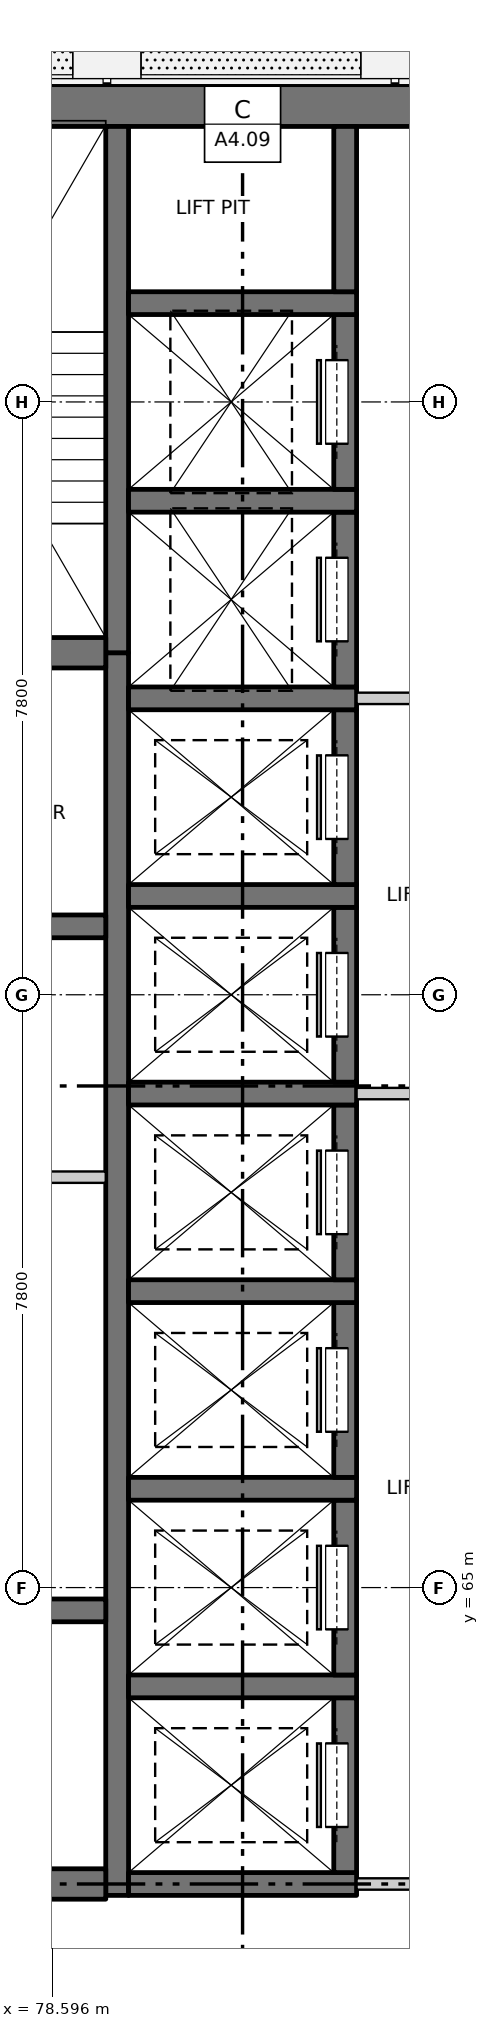
"""IFC4 building model, lengths in metres.
Left out: names, types, materials, properties, quantities, classifications, styles, units other than length and angle.
Written with IfcOpenShell. Run it as: python <this file> out.ifc"""

import sys

from ifc_helpers import new_model, si_unit, direction, frame, frame_2d, origin, place, context, subcontext, project, spatial, rectangle, extrude, element, fill, save


model = new_model("IFC4")
c1 = context("Model", 3, precision=1e-05, world=origin(), true_north=direction((0.0, 1.0)))
c2 = subcontext(c1, "Body", "Model", "MODEL_VIEW")
j1 = project(units=[si_unit("LENGTHUNIT", "METRE"), si_unit("PLANEANGLEUNIT", "RADIAN")], contexts=[c1])
p1 = place(None, origin())
s1 = spatial("IfcSite", under=j1, at=p1, CompositionType="ELEMENT")
p2 = place(p1, origin())
s2 = spatial("IfcBuilding", under=s1, at=p2, CompositionType="ELEMENT")
p3 = place(p2, frame((0.0, 0.0, 130.5)))
s3 = spatial("IfcBuildingStorey", under=s2, at=p3, CompositionType="ELEMENT", Elevation=130.5)
p4 = place(p3, frame((75.525, 84.5, -0.25), z_axis=(0.0, 0.0, 1.0), x_axis=(1.0, 0.0, 0.0)))
e1 = element("IfcWall", 1, at=p4, inside=s3, PredefinedType="SOLIDWALL", context=c2, shape_type="SweptSolid", body=[
    extrude(rectangle(XDim=18.95, YDim=0.55, at=frame_2d((9.475, 0.0))), origin(), (0.0, 0.0, 1.0), 3.4),
])
p5 = place(p3, frame((79.45, 60.95, -0.25), z_axis=(0.0, 0.0, 1.0), x_axis=(0.0, 1.0, 0.0)))
e2 = element("IfcWall", 2, at=p5, inside=s3, PredefinedType="SOLIDWALL", context=c2, shape_type="SweptSolid", body=[
    extrude(rectangle(XDim=16.35, YDim=0.3, at=frame_2d((8.175, 0.0))), origin(), (0.0, 0.0, 1.0), 3.4),
])
p6 = place(p3, frame((79.45, 77.3, -0.25), z_axis=(0.0, 0.0, 1.0), x_axis=(0.0, 1.0, 0.0)))
e3 = element("IfcWall", 3, at=p6, inside=s3, PredefinedType="SOLIDWALL", context=c2, shape_type="SweptSolid", body=[
    extrude(rectangle(XDim=6.925, YDim=0.3, at=frame_2d((3.462, 0.0))), origin(), (0.0, 0.0, 1.0), 3.4),
])
p7 = place(p3, frame((79.6, 61.1, -0.25), z_axis=(0.0, 0.0, 1.0), x_axis=(1.0, 0.0, 0.0)))
e4 = element("IfcWall", 4, at=p7, inside=s3, PredefinedType="SOLIDWALL", context=c2, shape_type="SweptSolid", body=[
    extrude(rectangle(XDim=3.0, YDim=0.3, at=frame_2d((1.5, 0.0))), origin(), (0.0, 0.0, 1.0), 3.4),
])
p8 = place(p3, frame((82.45, 61.25, -0.25), z_axis=(0.0, 0.0, 1.0), x_axis=(0.0, 1.0, 0.0)))
e5 = element("IfcWall", 5, at=p8, inside=s3, PredefinedType="SOLIDWALL", context=c2, shape_type="SweptSolid", body=[
    extrude(rectangle(XDim=2.3, YDim=0.3, at=frame_2d((1.15, 0.0))), origin(), (0.0, 0.0, 1.0), 3.4),
])
p9 = place(p8, frame((0.6, 0.0, 0.25)))
e6 = element("IfcOpeningElement", 6, at=p9, cuts=e5, PredefinedType="OPENING", context=c2, shape_type="SweptSolid", body=[
    extrude(rectangle(XDim=1.1, YDim=2.1, at=frame_2d((0.55, 1.05))), frame((0.0, 0.16, 0.0), z_axis=(0.0, -1.0, 0.0), x_axis=(1.0, 0.0, 0.0)), (0.0, 0.0, 1.0), 0.32),
])
p10 = place(p3, frame((79.6, 63.7, -0.25), z_axis=(0.0, 0.0, 1.0), x_axis=(1.0, 0.0, 0.0)))
e7 = element("IfcWall", 7, at=p10, inside=s3, PredefinedType="SOLIDWALL", context=c2, shape_type="SweptSolid", body=[
    extrude(rectangle(XDim=3.0, YDim=0.3, at=frame_2d((1.5, 0.0))), origin(), (0.0, 0.0, 1.0), 3.4),
])
p11 = place(p3, frame((82.45, 63.85, -0.25), z_axis=(0.0, 0.0, 1.0), x_axis=(0.0, 1.0, 0.0)))
e8 = element("IfcWall", 8, at=p11, inside=s3, PredefinedType="SOLIDWALL", context=c2, shape_type="SweptSolid", body=[
    extrude(rectangle(XDim=2.3, YDim=0.3, at=frame_2d((1.15, 0.0))), origin(), (0.0, 0.0, 1.0), 3.4),
])
p12 = place(p11, frame((0.6, 0.0, 0.25)))
e9 = element("IfcOpeningElement", 9, at=p12, cuts=e8, PredefinedType="OPENING", context=c2, shape_type="SweptSolid", body=[
    extrude(rectangle(XDim=1.1, YDim=2.1, at=frame_2d((0.55, 1.05))), frame((0.0, 0.16, 0.0), z_axis=(0.0, -1.0, 0.0), x_axis=(1.0, 0.0, 0.0)), (0.0, 0.0, 1.0), 0.32),
])
p13 = place(p3, frame((79.6, 66.3, -0.25), z_axis=(0.0, 0.0, 1.0), x_axis=(1.0, 0.0, 0.0)))
e10 = element("IfcWall", 10, at=p13, inside=s3, PredefinedType="SOLIDWALL", context=c2, shape_type="SweptSolid", body=[
    extrude(rectangle(XDim=3.0, YDim=0.3, at=frame_2d((1.5, 0.0))), origin(), (0.0, 0.0, 1.0), 3.4),
])
p14 = place(p3, frame((82.45, 66.45, -0.25), z_axis=(0.0, 0.0, 1.0), x_axis=(0.0, 1.0, 0.0)))
e11 = element("IfcWall", 11, at=p14, inside=s3, PredefinedType="SOLIDWALL", context=c2, shape_type="SweptSolid", body=[
    extrude(rectangle(XDim=2.3, YDim=0.3, at=frame_2d((1.15, 0.0))), origin(), (0.0, 0.0, 1.0), 3.4),
])
p15 = place(p14, frame((0.6, 0.0, 0.25)))
e12 = element("IfcOpeningElement", 12, at=p15, cuts=e11, PredefinedType="OPENING", context=c2, shape_type="SweptSolid", body=[
    extrude(rectangle(XDim=1.1, YDim=2.1, at=frame_2d((0.55, 1.05))), frame((0.0, 0.16, 0.0), z_axis=(0.0, -1.0, 0.0), x_axis=(1.0, 0.0, 0.0)), (0.0, 0.0, 1.0), 0.32),
])
p16 = place(p3, frame((79.6, 68.9, -0.25), z_axis=(0.0, 0.0, 1.0), x_axis=(1.0, 0.0, 0.0)))
e13 = element("IfcWall", 13, at=p16, inside=s3, PredefinedType="SOLIDWALL", context=c2, shape_type="SweptSolid", body=[
    extrude(rectangle(XDim=3.0, YDim=0.3, at=frame_2d((1.5, 0.0))), origin(), (0.0, 0.0, 1.0), 3.4),
])
p17 = place(p3, frame((82.45, 69.05, -0.25), z_axis=(0.0, 0.0, 1.0), x_axis=(0.0, 1.0, 0.0)))
e14 = element("IfcWall", 14, at=p17, inside=s3, PredefinedType="SOLIDWALL", context=c2, shape_type="SweptSolid", body=[
    extrude(rectangle(XDim=2.3, YDim=0.3, at=frame_2d((1.15, 0.0))), origin(), (0.0, 0.0, 1.0), 3.4),
])
p18 = place(p17, frame((0.6, 0.0, 0.25)))
e15 = element("IfcOpeningElement", 15, at=p18, cuts=e14, PredefinedType="OPENING", context=c2, shape_type="SweptSolid", body=[
    extrude(rectangle(XDim=1.1, YDim=2.1, at=frame_2d((0.55, 1.05))), frame((0.0, 0.16, 0.0), z_axis=(0.0, -1.0, 0.0), x_axis=(1.0, 0.0, 0.0)), (0.0, 0.0, 1.0), 0.32),
])
p19 = place(p3, frame((79.6, 71.5, -0.25), z_axis=(0.0, 0.0, 1.0), x_axis=(1.0, 0.0, 0.0)))
e16 = element("IfcWall", 16, at=p19, inside=s3, PredefinedType="SOLIDWALL", context=c2, shape_type="SweptSolid", body=[
    extrude(rectangle(XDim=3.0, YDim=0.3, at=frame_2d((1.5, 0.0))), origin(), (0.0, 0.0, 1.0), 3.4),
])
p20 = place(p3, frame((82.45, 71.65, -0.25), z_axis=(0.0, 0.0, 1.0), x_axis=(0.0, 1.0, 0.0)))
e17 = element("IfcWall", 17, at=p20, inside=s3, PredefinedType="SOLIDWALL", context=c2, shape_type="SweptSolid", body=[
    extrude(rectangle(XDim=2.3, YDim=0.3, at=frame_2d((1.15, 0.0))), origin(), (0.0, 0.0, 1.0), 3.4),
])
p21 = place(p20, frame((0.6, 0.0, 0.25)))
e18 = element("IfcOpeningElement", 18, at=p21, cuts=e17, PredefinedType="OPENING", context=c2, shape_type="SweptSolid", body=[
    extrude(rectangle(XDim=1.1, YDim=2.1, at=frame_2d((0.55, 1.05))), frame((0.0, 0.16, 0.0), z_axis=(0.0, -1.0, 0.0), x_axis=(1.0, 0.0, 0.0)), (0.0, 0.0, 1.0), 0.32),
])
p22 = place(p3, frame((79.6, 74.1, -0.25), z_axis=(0.0, 0.0, 1.0), x_axis=(1.0, 0.0, 0.0)))
e19 = element("IfcWall", 19, at=p22, inside=s3, PredefinedType="SOLIDWALL", context=c2, shape_type="SweptSolid", body=[
    extrude(rectangle(XDim=3.0, YDim=0.3, at=frame_2d((1.5, 0.0))), origin(), (0.0, 0.0, 1.0), 3.4),
])
p23 = place(p3, frame((82.45, 74.25, -0.25), z_axis=(0.0, 0.0, 1.0), x_axis=(0.0, 1.0, 0.0)))
e20 = element("IfcWall", 20, at=p23, inside=s3, PredefinedType="SOLIDWALL", context=c2, shape_type="SweptSolid", body=[
    extrude(rectangle(XDim=2.3, YDim=0.3, at=frame_2d((1.15, 0.0))), origin(), (0.0, 0.0, 1.0), 3.4),
])
p24 = place(p23, frame((0.6, 0.0, 0.25)))
e21 = element("IfcOpeningElement", 21, at=p24, cuts=e20, PredefinedType="OPENING", context=c2, shape_type="SweptSolid", body=[
    extrude(rectangle(XDim=1.1, YDim=2.1, at=frame_2d((0.55, 1.05))), frame((0.0, 0.16, 0.0), z_axis=(0.0, -1.0, 0.0), x_axis=(1.0, 0.0, 0.0)), (0.0, 0.0, 1.0), 0.32),
])
p25 = place(p3, frame((79.6, 76.7, -0.25), z_axis=(0.0, 0.0, 1.0), x_axis=(1.0, 0.0, 0.0)))
e22 = element("IfcWall", 22, at=p25, inside=s3, PredefinedType="SOLIDWALL", context=c2, shape_type="SweptSolid", body=[
    extrude(rectangle(XDim=3.0, YDim=0.3, at=frame_2d((1.5, 0.0))), origin(), (0.0, 0.0, 1.0), 3.4),
])
p26 = place(p3, frame((82.45, 76.85, -0.25), z_axis=(0.0, 0.0, 1.0), x_axis=(0.0, 1.0, 0.0)))
e23 = element("IfcWall", 23, at=p26, inside=s3, PredefinedType="SOLIDWALL", context=c2, shape_type="SweptSolid", body=[
    extrude(rectangle(XDim=2.3, YDim=0.3, at=frame_2d((1.15, 0.0))), origin(), (0.0, 0.0, 1.0), 3.4),
])
p27 = place(p26, frame((0.6, 0.0, 0.25)))
e24 = element("IfcOpeningElement", 24, at=p27, cuts=e23, PredefinedType="OPENING", context=c2, shape_type="SweptSolid", body=[
    extrude(rectangle(XDim=1.1, YDim=2.1, at=frame_2d((0.55, 1.05))), frame((0.0, 0.16, 0.0), z_axis=(0.0, -1.0, 0.0), x_axis=(1.0, 0.0, 0.0)), (0.0, 0.0, 1.0), 0.32),
])
p28 = place(p3, frame((79.6, 79.3, -0.25), z_axis=(0.0, 0.0, 1.0), x_axis=(1.0, 0.0, 0.0)))
e25 = element("IfcWall", 25, at=p28, inside=s3, PredefinedType="SOLIDWALL", context=c2, shape_type="SweptSolid", body=[
    extrude(rectangle(XDim=3.0, YDim=0.3, at=frame_2d((1.5, 0.0))), origin(), (0.0, 0.0, 1.0), 3.4),
])
p29 = place(p3, frame((82.45, 79.45, -0.25), z_axis=(0.0, 0.0, 1.0), x_axis=(0.0, 1.0, 0.0)))
e26 = element("IfcWall", 26, at=p29, inside=s3, PredefinedType="SOLIDWALL", context=c2, shape_type="SweptSolid", body=[
    extrude(rectangle(XDim=2.3, YDim=0.3, at=frame_2d((1.15, 0.0))), origin(), (0.0, 0.0, 1.0), 3.4),
])
p30 = place(p29, frame((0.6, 0.0, 0.25)))
e27 = element("IfcOpeningElement", 27, at=p30, cuts=e26, PredefinedType="OPENING", context=c2, shape_type="SweptSolid", body=[
    extrude(rectangle(XDim=1.1, YDim=2.1, at=frame_2d((0.55, 1.05))), frame((0.0, 0.16, 0.0), z_axis=(0.0, -1.0, 0.0), x_axis=(1.0, 0.0, 0.0)), (0.0, 0.0, 1.0), 0.32),
])
p31 = place(p3, frame((79.6, 81.9, -0.25), z_axis=(0.0, 0.0, 1.0), x_axis=(1.0, 0.0, 0.0)))
e28 = element("IfcWall", 28, at=p31, inside=s3, PredefinedType="SOLIDWALL", context=c2, shape_type="SweptSolid", body=[
    extrude(rectangle(XDim=3.0, YDim=0.3, at=frame_2d((1.5, 0.0))), origin(), (0.0, 0.0, 1.0), 3.4),
])
p32 = place(p3, frame((82.45, 82.05, -0.25), z_axis=(0.0, 0.0, 1.0), x_axis=(0.0, 1.0, 0.0)))
e29 = element("IfcWall", 29, at=p32, inside=s3, PredefinedType="SOLIDWALL", context=c2, shape_type="SweptSolid", body=[
    extrude(rectangle(XDim=2.175, YDim=0.3, at=frame_2d((1.087, 0.0))), origin(), (0.0, 0.0, 1.0), 3.4),
])
p33 = place(p3, frame((75.525, 61.1, -0.25), z_axis=(0.0, 0.0, 1.0), x_axis=(1.0, 0.0, 0.0)))
e30 = element("IfcWall", 30, at=p33, inside=s3, PredefinedType="SOLIDWALL", context=c2, shape_type="SweptSolid", body=[
    extrude(rectangle(XDim=3.775, YDim=0.4, at=frame_2d((1.888, 0.0))), origin(), (0.0, 0.0, 1.0), 3.4),
])
for number, where, z_axis, x_axis in (
    (31, (75.525, 64.7, -0.25), (0.0, 0.0, 1.0), (1.0, 0.0, 0.0)),
    (32, (75.525, 73.7, -0.25), (0.0, 0.0, 1.0), (1.0, 0.0, 0.0)),
):
    element("IfcWall", number, at=place(p3, frame(where, z_axis=z_axis, x_axis=x_axis)), inside=s3, PredefinedType="SOLIDWALL", context=c2, shape_type="SweptSolid", body=[
        extrude(rectangle(XDim=3.775, YDim=0.3, at=frame_2d((1.888, 0.0))), origin(), (0.0, 0.0, 1.0), 3.4),
    ])
p34 = place(p3, frame((75.525, 77.3, -0.25), z_axis=(0.0, 0.0, 1.0), x_axis=(1.0, 0.0, 0.0)))
e33 = element("IfcWall", 33, at=p34, inside=s3, PredefinedType="SOLIDWALL", context=c2, shape_type="SweptSolid", body=[
    extrude(rectangle(XDim=3.775, YDim=0.4, at=frame_2d((1.888, 0.0))), origin(), (0.0, 0.0, 1.0), 3.4),
])
p35 = place(p3, frame((82.6, 61.1, 0.0), z_axis=(0.0, 0.0, 1.0), x_axis=(1.0, 0.0, 0.0)))
e34 = element("IfcWall", 34, at=p35, inside=s3, PredefinedType="PARTITIONING", context=c2, shape_type="SweptSolid", body=[
    extrude(rectangle(XDim=4.8, YDim=0.15, at=frame_2d((2.4, 0.0))), origin(), (0.0, 0.0, 1.0), 3.15),
])
p36 = place(p35, frame((1.5, 0.0, 0.0)))
e35 = element("IfcOpeningElement", 35, at=p36, cuts=e34, PredefinedType="OPENING", context=c2, shape_type="SweptSolid", body=[
    extrude(rectangle(XDim=1.8, YDim=2.1, at=frame_2d((0.9, 1.05))), frame((0.0, 0.085, 0.0), z_axis=(0.0, -1.0, 0.0), x_axis=(1.0, 0.0, 0.0)), (0.0, 0.0, 1.0), 0.17),
])
p37 = place(p3, frame((75.525, 70.4, 0.0), z_axis=(0.0, 0.0, 1.0), x_axis=(1.0, 0.0, 0.0)))
e36 = element("IfcWall", 36, at=p37, inside=s3, PredefinedType="PARTITIONING", context=c2, shape_type="SweptSolid", body=[
    extrude(rectangle(XDim=3.775, YDim=0.15, at=frame_2d((1.887, 0.0))), origin(), (0.0, 0.0, 1.0), 3.15),
])
p38 = place(p3, frame((82.6, 71.5, 0.0), z_axis=(0.0, 0.0, 1.0), x_axis=(1.0, 0.0, 0.0)))
e37 = element("IfcWall", 37, at=p38, inside=s3, PredefinedType="PARTITIONING", context=c2, shape_type="SweptSolid", body=[
    extrude(rectangle(XDim=4.8, YDim=0.15, at=frame_2d((2.4, 0.0))), origin(), (0.0, 0.0, 1.0), 3.15),
])
p39 = place(p38, frame((1.5, 0.0, 0.0)))
e38 = element("IfcOpeningElement", 38, at=p39, cuts=e37, PredefinedType="OPENING", context=c2, shape_type="SweptSolid", body=[
    extrude(rectangle(XDim=1.8, YDim=2.1, at=frame_2d((0.9, 1.05))), frame((0.0, 0.085, 0.0), z_axis=(0.0, -1.0, 0.0), x_axis=(1.0, 0.0, 0.0)), (0.0, 0.0, 1.0), 0.17),
])
p40 = place(p3, frame((82.6, 76.7, 0.0), z_axis=(0.0, 0.0, 1.0), x_axis=(1.0, 0.0, 0.0)))
e39 = element("IfcWall", 39, at=p40, inside=s3, PredefinedType="PARTITIONING", context=c2, shape_type="SweptSolid", body=[
    extrude(rectangle(XDim=4.8, YDim=0.15, at=frame_2d((2.4, 0.0))), origin(), (0.0, 0.0, 1.0), 3.15),
])
p41 = place(p40, frame((1.5, 0.0, 0.0)))
e40 = element("IfcOpeningElement", 40, at=p41, cuts=e39, PredefinedType="OPENING", context=c2, shape_type="SweptSolid", body=[
    extrude(rectangle(XDim=1.8, YDim=2.1, at=frame_2d((0.9, 1.05))), frame((0.0, 0.085, 0.0), z_axis=(0.0, -1.0, 0.0), x_axis=(1.0, 0.0, 0.0)), (0.0, 0.0, 1.0), 0.17),
])
p42 = place(p9, origin())
e41 = element("IfcDoor", 41, at=p42, inside=s3, OperationType="SLIDING_TO_RIGHT", PredefinedType="DOOR", context=c2, shape_type="SweptSolid", body=[
    extrude(rectangle(XDim=1.1, YDim=2.1, at=frame_2d((0.55, 1.05))), frame((0.0, 0.135, 0.0), z_axis=(0.0, -1.0, 0.0), x_axis=(1.0, 0.0, 0.0)), (0.0, 0.0, 1.0), 0.05),
])
fill(e6, e41)
p43 = place(p12, origin())
e42 = element("IfcDoor", 42, at=p43, inside=s3, OperationType="SLIDING_TO_RIGHT", PredefinedType="DOOR", context=c2, shape_type="SweptSolid", body=[
    extrude(rectangle(XDim=1.1, YDim=2.1, at=frame_2d((0.55, 1.05))), frame((0.0, 0.135, 0.0), z_axis=(0.0, -1.0, 0.0), x_axis=(1.0, 0.0, 0.0)), (0.0, 0.0, 1.0), 0.05),
])
fill(e9, e42)
p44 = place(p15, origin())
e43 = element("IfcDoor", 43, at=p44, inside=s3, OperationType="SLIDING_TO_RIGHT", PredefinedType="DOOR", context=c2, shape_type="SweptSolid", body=[
    extrude(rectangle(XDim=1.1, YDim=2.1, at=frame_2d((0.55, 1.05))), frame((0.0, 0.135, 0.0), z_axis=(0.0, -1.0, 0.0), x_axis=(1.0, 0.0, 0.0)), (0.0, 0.0, 1.0), 0.05),
])
fill(e12, e43)
p45 = place(p18, origin())
e44 = element("IfcDoor", 44, at=p45, inside=s3, OperationType="SLIDING_TO_LEFT", PredefinedType="DOOR", context=c2, shape_type="SweptSolid", body=[
    extrude(rectangle(XDim=1.1, YDim=2.1, at=frame_2d((0.55, 1.05))), frame((0.0, 0.135, 0.0), z_axis=(0.0, -1.0, 0.0), x_axis=(1.0, 0.0, 0.0)), (0.0, 0.0, 1.0), 0.05),
])
fill(e15, e44)
p46 = place(p21, origin())
e45 = element("IfcDoor", 45, at=p46, inside=s3, OperationType="SLIDING_TO_LEFT", PredefinedType="DOOR", context=c2, shape_type="SweptSolid", body=[
    extrude(rectangle(XDim=1.1, YDim=2.1, at=frame_2d((0.55, 1.05))), frame((0.0, 0.135, 0.0), z_axis=(0.0, -1.0, 0.0), x_axis=(1.0, 0.0, 0.0)), (0.0, 0.0, 1.0), 0.05),
])
fill(e18, e45)
p47 = place(p24, origin())
e46 = element("IfcDoor", 46, at=p47, inside=s3, OperationType="SLIDING_TO_LEFT", PredefinedType="DOOR", context=c2, shape_type="SweptSolid", body=[
    extrude(rectangle(XDim=1.1, YDim=2.1, at=frame_2d((0.55, 1.05))), frame((0.0, 0.135, 0.0), z_axis=(0.0, -1.0, 0.0), x_axis=(1.0, 0.0, 0.0)), (0.0, 0.0, 1.0), 0.05),
])
fill(e21, e46)
p48 = place(p27, origin())
e47 = element("IfcDoor", 47, at=p48, inside=s3, OperationType="SLIDING_TO_LEFT", PredefinedType="DOOR", context=c2, shape_type="SweptSolid", body=[
    extrude(rectangle(XDim=1.1, YDim=2.1, at=frame_2d((0.55, 1.05))), frame((0.0, 0.135, 0.0), z_axis=(0.0, -1.0, 0.0), x_axis=(1.0, 0.0, 0.0)), (0.0, 0.0, 1.0), 0.05),
])
fill(e24, e47)
p49 = place(p30, origin())
e48 = element("IfcDoor", 48, at=p49, inside=s3, OperationType="SLIDING_TO_LEFT", PredefinedType="DOOR", context=c2, shape_type="SweptSolid", body=[
    extrude(rectangle(XDim=1.1, YDim=2.1, at=frame_2d((0.55, 1.05))), frame((0.0, 0.135, 0.0), z_axis=(0.0, -1.0, 0.0), x_axis=(1.0, 0.0, 0.0)), (0.0, 0.0, 1.0), 0.05),
])
fill(e27, e48)
save(model, sys.argv[1])
